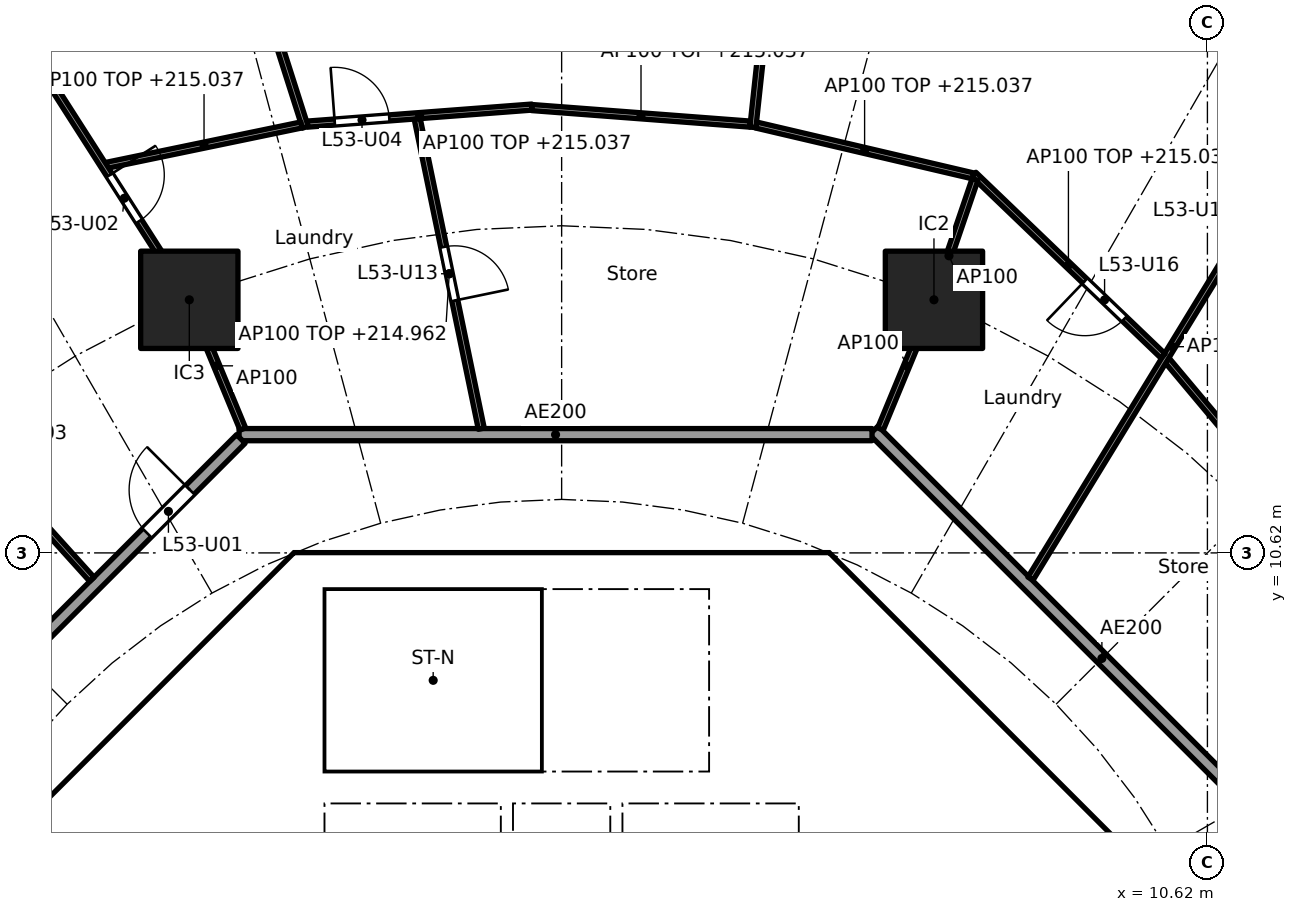
"""IFC4 building model, lengths in metres.
Left out: names, types, materials, properties, quantities, classifications, styles, units other than length and angle.
Written with IfcOpenShell. Run it as: python <this file> out.ifc"""

import sys

from ifc_helpers import new_model, si_unit, direction, frame, frame_2d, origin, origin_2d, place, context, subcontext, project, spatial, polyline, rectangle, outline, extrude, element, fill, save


model = new_model("IFC4")
c1 = context("Model", 3, precision=1e-05, world=origin(), true_north=direction((0.0, 1.0)))
c2 = subcontext(c1, "Body", "Model", "MODEL_VIEW")
j1 = project(units=[si_unit("LENGTHUNIT", "METRE"), si_unit("PLANEANGLEUNIT", "RADIAN")], contexts=[c1])
p1 = place(None, origin())
s1 = spatial("IfcSite", under=j1, at=p1, CompositionType="ELEMENT")
p2 = place(p1, origin())
s2 = spatial("IfcBuilding", under=s1, at=p2, CompositionType="ELEMENT")
p3 = place(p2, frame((0.0, 0.0, 212.2)))
s3 = spatial("IfcBuildingStorey", under=s2, at=p3, CompositionType="ELEMENT", Elevation=212.2)
for number, where, z_axis, x_axis in (
    (1, (6.123, 14.782, 0.0), (0.0, 0.0, 1.0), (1.0, 0.0, 0.0)),
    (2, (-6.123, 14.782, 0.0), (0.0, 0.0, 1.0), (1.0, 0.0, 0.0)),
):
    element("IfcColumn", number, at=place(p3, frame(where, z_axis=z_axis, x_axis=x_axis)), inside=s3, PredefinedType="COLUMN", context=c2, shape_type="SweptSolid", body=[
        extrude(rectangle(XDim=1.6, YDim=1.6, at=origin_2d()), origin(), (0.0, 0.0, 1.0), 3.7),
    ])
p4 = place(p3, frame((9.988, 4.613, 0.0), z_axis=(0.0, 0.0, 1.0), x_axis=(-0.707106781187, 0.707106781187, 0.0)))
e3 = element("IfcWall", 3, at=p4, inside=s3, PredefinedType="SHEAR", context=c2, shape_type="SweptSolid", body=[
    extrude(rectangle(XDim=7.602, YDim=0.6, at=frame_2d((3.801, 0.0))), origin(), (0.0, 0.0, 1.0), 3.44),
])
p5 = place(p4, frame((3.201, 0.0, 0.0)))
e4 = element("IfcOpeningElement", 4, at=p5, cuts=e3, PredefinedType="OPENING", context=c2, shape_type="SweptSolid", body=[
    extrude(rectangle(XDim=1.2, YDim=2.1, at=frame_2d((0.6, 1.05))), frame((0.0, 0.31, 0.0), z_axis=(0.0, -1.0, 0.0), x_axis=(1.0, 0.0, 0.0)), (0.0, 0.0, 1.0), 0.62),
])
p6 = place(p3, frame((-4.613, 9.988, 0.0), z_axis=(0.0, 0.0, 1.0), x_axis=(-0.707106781187, -0.707106781187, 0.0)))
e5 = element("IfcWall", 5, at=p6, inside=s3, PredefinedType="SHEAR", context=c2, shape_type="SweptSolid", body=[
    extrude(rectangle(XDim=7.602, YDim=0.6, at=frame_2d((3.801, 0.0))), origin(), (0.0, 0.0, 1.0), 3.44),
])
p7 = place(p6, frame((0.351, 0.0, 0.0)))
e6 = element("IfcOpeningElement", 6, at=p7, cuts=e5, PredefinedType="OPENING", context=c2, shape_type="SweptSolid", body=[
    extrude(rectangle(XDim=1.1, YDim=2.1, at=frame_2d((0.55, 1.05))), frame((0.0, 0.31, 0.0), z_axis=(0.0, -1.0, 0.0), x_axis=(1.0, 0.0, 0.0)), (0.0, 0.0, 1.0), 0.62),
])
p8 = place(p3, frame((-5.8, 4.3, 0.0), z_axis=(0.0, 0.0, 1.0), x_axis=(0.0, 1.0, 0.0)))
e7 = element("IfcWall", 7, at=p8, inside=s3, PredefinedType="PARTITIONING", context=c2, shape_type="SweptSolid", body=[
    extrude(rectangle(XDim=3.927, YDim=0.15, at=frame_2d((1.963, 0.0))), origin(), (0.0, 0.0, 1.0), 3.44),
])
p9 = place(p8, frame((1.551, 0.0, 0.0)))
e8 = element("IfcOpeningElement", 8, at=p9, cuts=e7, PredefinedType="OPENING", context=c2, shape_type="SweptSolid", body=[
    extrude(rectangle(XDim=0.9, YDim=2.1, at=frame_2d((0.45, 1.05))), frame((0.0, 0.085, 0.0), z_axis=(0.0, -1.0, 0.0), x_axis=(1.0, 0.0, 0.0)), (0.0, 0.0, 1.0), 0.17),
])
p10 = place(p3, frame((4.0, 4.3, 0.0), z_axis=(0.0, 0.0, 1.0), x_axis=(0.0, 1.0, 0.0)))
e9 = element("IfcWall", 9, at=p10, inside=s3, PredefinedType="SOLIDWALL", context=c2, shape_type="SweptSolid", body=[
    extrude(rectangle(XDim=2.2, YDim=0.2, at=frame_2d((1.1, 0.0))), origin(), (0.0, 0.0, 1.0), 3.44),
])
p11 = place(p10, frame((0.55, 0.0, 0.0)))
e10 = element("IfcOpeningElement", 10, at=p11, cuts=e9, PredefinedType="OPENING", context=c2, shape_type="SweptSolid", body=[
    extrude(rectangle(XDim=1.1, YDim=2.1, at=frame_2d((0.55, 1.05))), frame((0.0, 0.11, 0.0), z_axis=(0.0, -1.0, 0.0), x_axis=(1.0, 0.0, 0.0)), (0.0, 0.0, 1.0), 0.22),
])
p12 = place(p3, frame((-4.0, 4.3, 0.0), z_axis=(0.0, 0.0, 1.0), x_axis=(0.0, 1.0, 0.0)))
e11 = element("IfcWall", 11, at=p12, inside=s3, PredefinedType="SOLIDWALL", context=c2, shape_type="SweptSolid", body=[
    extrude(rectangle(XDim=2.2, YDim=0.2, at=frame_2d((1.1, 0.0))), origin(), (0.0, 0.0, 1.0), 3.44),
])
p13 = place(p12, frame((0.55, 0.0, 0.0)))
e12 = element("IfcOpeningElement", 12, at=p13, cuts=e11, PredefinedType="OPENING", context=c2, shape_type="SweptSolid", body=[
    extrude(rectangle(XDim=1.1, YDim=2.1, at=frame_2d((0.55, 1.05))), frame((0.0, 0.11, 0.0), z_axis=(0.0, -1.0, 0.0), x_axis=(1.0, 0.0, 0.0)), (0.0, 0.0, 1.0), 0.22),
])
p14 = place(p3, frame((4.0, 7.025, 0.0), z_axis=(0.0, 0.0, 1.0), x_axis=(0.0, 1.0, 0.0)))
e13 = element("IfcWall", 13, at=p14, inside=s3, PredefinedType="SOLIDWALL", context=c2, shape_type="SweptSolid", body=[
    extrude(rectangle(XDim=3.0, YDim=0.2, at=frame_2d((1.5, 0.0))), origin(), (0.0, 0.0, 1.0), 3.44),
])
p15 = place(p14, frame((0.925, 0.0, 0.0)))
e14 = element("IfcOpeningElement", 14, at=p15, cuts=e13, PredefinedType="OPENING", context=c2, shape_type="SweptSolid", body=[
    extrude(rectangle(XDim=1.1, YDim=2.1, at=frame_2d((0.55, 1.05))), frame((0.0, 0.11, 0.0), z_axis=(0.0, -1.0, 0.0), x_axis=(1.0, 0.0, 0.0)), (0.0, 0.0, 1.0), 0.22),
])
p16 = place(p3, origin())
e15 = element("IfcWall", 15, at=p16, inside=s3, PredefinedType="SHEAR", context=c2, shape_type="SweptSolid", body=[
    extrude(outline(polyline([(-4.152, 10.025), (-4.401, 9.776), (-4.825, 10.2), (-4.401, 10.625), (4.401, 10.625), (4.825, 10.2), (4.401, 9.776), (4.152, 10.025), (-4.152, 10.025)])), origin(), (0.0, 0.0, 1.0), 3.44),
])
for number, where, z_axis, x_axis in (
    (16, (-0.9, 4.3, 0.0), (0.0, 0.0, 1.0), (0.0, 1.0, 0.0)),
    (17, (0.9, 4.3, 0.0), (0.0, 0.0, 1.0), (0.0, 1.0, 0.0)),
):
    element("IfcWall", number, at=place(p3, frame(where, z_axis=z_axis, x_axis=x_axis)), inside=s3, PredefinedType="SOLIDWALL", context=c2, shape_type="SweptSolid", body=[
        extrude(rectangle(XDim=2.2, YDim=0.2, at=frame_2d((1.1, 0.0))), origin(), (0.0, 0.0, 1.0), 3.44),
    ])
p17 = place(p3, origin())
e18 = element("IfcWall", 18, at=p17, inside=s3, PredefinedType="SOLIDWALL", context=c2, shape_type="SweptSolid", body=[
    extrude(outline(polyline([(-3.9, 7.025), (-4.1, 7.025), (-4.1, 10.025), (-3.9, 10.025), (-3.9, 7.025)])), origin(), (0.0, 0.0, 1.0), 3.44),
])
p18 = place(p3, origin())
e19 = element("IfcWall", 19, at=p18, inside=s3, PredefinedType="SOLIDWALL", context=c2, shape_type="SweptSolid", body=[
    extrude(outline(polyline([(4.1, 6.5), (-4.1, 6.5), (-4.1, 7.025), (4.1, 7.025), (4.1, 6.5)])), origin(), (0.0, 0.0, 1.0), 3.44),
])
p19 = place(p3, frame((12.635, 5.134, 0.0), z_axis=(0.0, 0.0, 1.0), x_axis=(-0.707106781187, 0.707106781187, 0.0)))
e20 = element("IfcWall", 20, at=p19, inside=s3, PredefinedType="PARTITIONING", context=c2, shape_type="SweptSolid", body=[
    extrude(rectangle(XDim=10.609, YDim=0.2, at=frame_2d((5.305, 0.0))), origin(), (0.0, 0.0, 1.0), 3.44),
])
p20 = place(p3, frame((5.104, 12.565, 0.0), z_axis=(0.0, 0.0, 1.0), x_axis=(-1.0, 0.0, 0.0)))
e21 = element("IfcWall", 21, at=p20, inside=s3, PredefinedType="PARTITIONING", context=c2, shape_type="SweptSolid", body=[
    extrude(rectangle(XDim=10.409, YDim=0.2, at=frame_2d((5.205, 0.0))), origin(), (0.0, 0.0, 1.0), 3.44),
])
p21 = place(p3, frame((-5.275, 12.494, 0.0), z_axis=(0.0, 0.0, 1.0), x_axis=(-0.707106781187, -0.707106781187, 0.0)))
e22 = element("IfcWall", 22, at=p21, inside=s3, PredefinedType="PARTITIONING", context=c2, shape_type="SweptSolid", body=[
    extrude(rectangle(XDim=10.209, YDim=0.2, at=frame_2d((5.104, 0.0))), origin(), (0.0, 0.0, 1.0), 3.44),
])
p22 = place(p21, frame((1.185, 0.0, 0.0)))
e23 = element("IfcOpeningElement", 23, at=p22, cuts=e22, PredefinedType="OPENING", context=c2, shape_type="SweptSolid", body=[
    extrude(rectangle(XDim=1.0, YDim=2.1, at=frame_2d((0.5, 1.05))), frame((0.0, 0.11, 0.0), z_axis=(0.0, -1.0, 0.0), x_axis=(1.0, 0.0, 0.0)), (0.0, 0.0, 1.0), 0.22),
])
p23 = place(p3, frame((12.759, 10.443, 0.0), z_axis=(0.0, 0.0, 1.0), x_axis=(-0.642225196965, 0.766516011825, 0.0)))
e24 = element("IfcWall", 24, at=p23, inside=s3, PredefinedType="PARTITIONING", context=c2, shape_type="SweptSolid", body=[
    extrude(rectangle(XDim=4.361, YDim=0.1, at=frame_2d((2.18, 0.0))), origin(), (0.0, 0.0, 1.0), 2.837),
])
p24 = place(p3, frame((7.71, 10.197, 0.0), z_axis=(0.0, 0.0, 1.0), x_axis=(0.521477621335, 0.853264959111, 0.0)))
e25 = element("IfcWall", 25, at=p24, inside=s3, PredefinedType="PARTITIONING", context=c2, shape_type="SweptSolid", body=[
    extrude(rectangle(XDim=8.941, YDim=0.1, at=frame_2d((4.471, 0.0))), origin(), (0.0, 0.0, 1.0), 2.762),
])
p25 = place(p24, frame((6.121, 0.0, 0.0)))
e26 = element("IfcOpeningElement", 26, at=p25, cuts=e25, PredefinedType="OPENING", context=c2, shape_type="SweptSolid", body=[
    extrude(rectangle(XDim=0.9, YDim=2.1, at=frame_2d((0.45, 1.05))), frame((0.0, 0.06, 0.0), z_axis=(0.0, -1.0, 0.0), x_axis=(1.0, 0.0, 0.0)), (0.0, 0.0, 1.0), 0.12),
])
p26 = place(p3, frame((9.89, 13.858, 0.0), z_axis=(0.0, 0.0, 1.0), x_axis=(-0.72167233993, 0.692234811159, 0.0)))
e27 = element("IfcWall", 27, at=p26, inside=s3, PredefinedType="PARTITIONING", context=c2, shape_type="SweptSolid", body=[
    extrude(rectangle(XDim=4.313, YDim=0.1, at=frame_2d((2.156, 0.0))), origin(), (0.0, 0.0, 1.0), 2.837),
])
p27 = place(p26, frame((0.883, 0.0, 0.0)))
e28 = element("IfcOpeningElement", 28, at=p27, cuts=e27, PredefinedType="OPENING", context=c2, shape_type="SweptSolid", body=[
    extrude(rectangle(XDim=0.9, YDim=2.1, at=frame_2d((0.45, 1.05))), frame((0.0, 0.06, 0.0), z_axis=(0.0, -1.0, 0.0), x_axis=(1.0, 0.0, 0.0)), (0.0, 0.0, 1.0), 0.12),
])
p28 = place(p3, frame((12.31, 17.817, 0.0), z_axis=(0.0, 0.0, 1.0), x_axis=(-0.739697052892, 0.672940019573, 0.0)))
e29 = element("IfcWall", 29, at=p28, inside=s3, PredefinedType="PARTITIONING", context=c2, shape_type="SweptSolid", body=[
    extrude(rectangle(XDim=5.365, YDim=0.1, at=frame_2d((2.683, 0.0))), origin(), (0.0, 0.0, 1.0), 2.837),
])
p29 = place(p28, frame((2.208, 0.0, 0.0)))
e30 = element("IfcOpeningElement", 30, at=p29, cuts=e29, PredefinedType="OPENING", context=c2, shape_type="SweptSolid", body=[
    extrude(rectangle(XDim=0.9, YDim=2.1, at=frame_2d((0.45, 1.05))), frame((0.0, 0.06, 0.0), z_axis=(0.0, -1.0, 0.0), x_axis=(1.0, 0.0, 0.0)), (0.0, 0.0, 1.0), 0.12),
])
p30 = place(p3, frame((5.243, 12.657, 0.0), z_axis=(0.0, 0.0, 1.0), x_axis=(0.382719158442, 0.923864733477, 0.0)))
e31 = element("IfcWall", 31, at=p30, inside=s3, PredefinedType="PARTITIONING", context=c2, shape_type="SweptSolid", body=[
    extrude(rectangle(XDim=2.25, YDim=0.1, at=frame_2d((1.125, 0.0))), origin(), (0.0, 0.0, 1.0), 3.44),
])
p31 = place(p3, frame((6.139, 14.829, 0.0), z_axis=(0.0, 0.0, 1.0), x_axis=(0.32278593828, 0.946471995385, 0.0)))
e32 = element("IfcWall", 32, at=p31, inside=s3, PredefinedType="PARTITIONING", context=c2, shape_type="SweptSolid", body=[
    extrude(rectangle(XDim=2.042, YDim=0.1, at=frame_2d((1.021, 0.0))), origin(), (0.0, 0.0, 1.0), 3.44),
])
p32 = place(p3, frame((6.766, 16.82, 0.0), z_axis=(0.0, 0.0, 1.0), x_axis=(-0.973612608559, 0.22820711745, 0.0)))
e33 = element("IfcWall", 33, at=p32, inside=s3, PredefinedType="PARTITIONING", context=c2, shape_type="SweptSolid", body=[
    extrude(rectangle(XDim=3.663, YDim=0.1, at=frame_2d((1.832, 0.0))), origin(), (0.0, 0.0, 1.0), 2.837),
])
p33 = place(p3, frame((3.145, 17.618, 0.0), z_axis=(0.0, 0.0, 1.0), x_axis=(0.106820754108, 0.994278294288, 0.0)))
e34 = element("IfcWall", 34, at=p33, inside=s3, PredefinedType="PARTITIONING", context=c2, shape_type="SweptSolid", body=[
    extrude(rectangle(XDim=5.574, YDim=0.1, at=frame_2d((2.787, 0.0))), origin(), (0.0, 0.0, 1.0), 3.44),
])
p34 = place(p33, frame((2.337, 0.0, 0.0)))
e35 = element("IfcOpeningElement", 35, at=p34, cuts=e34, PredefinedType="OPENING", context=c2, shape_type="SweptSolid", body=[
    extrude(rectangle(XDim=0.9, YDim=2.1, at=frame_2d((0.45, 1.05))), frame((0.0, 0.06, 0.0), z_axis=(0.0, -1.0, 0.0), x_axis=(1.0, 0.0, 0.0)), (0.0, 0.0, 1.0), 0.12),
])
p35 = place(p3, frame((3.101, 17.671, 0.0), z_axis=(0.0, 0.0, 1.0), x_axis=(-0.997133705575, 0.075659587668, 0.0)))
e36 = element("IfcWall", 36, at=p35, inside=s3, PredefinedType="PARTITIONING", context=c2, shape_type="SweptSolid", body=[
    extrude(rectangle(XDim=3.601, YDim=0.1, at=frame_2d((1.801, 0.0))), origin(), (0.0, 0.0, 1.0), 2.837),
])
p36 = place(p3, frame((-0.49, 17.951, 0.0), z_axis=(0.0, 0.0, 1.0), x_axis=(-0.997133495787, -0.075662352452, 0.0)))
e37 = element("IfcWall", 37, at=p36, inside=s3, PredefinedType="PARTITIONING", context=c2, shape_type="SweptSolid", body=[
    extrude(rectangle(XDim=3.701, YDim=0.1, at=frame_2d((1.851, 0.0))), origin(), (0.0, 0.0, 1.0), 2.837),
])
p37 = place(p36, frame((2.351, 0.0, 0.0)))
e38 = element("IfcOpeningElement", 38, at=p37, cuts=e37, PredefinedType="OPENING", context=c2, shape_type="SweptSolid", body=[
    extrude(rectangle(XDim=0.9, YDim=2.1, at=frame_2d((0.45, 1.05))), frame((0.0, 0.06, 0.0), z_axis=(0.0, -1.0, 0.0), x_axis=(1.0, 0.0, 0.0)), (0.0, 0.0, 1.0), 0.12),
])
p38 = place(p3, frame((-1.321, 12.663, 0.0), z_axis=(0.0, 0.0, 1.0), x_axis=(-0.202526486639, 0.979276785291, 0.0)))
e39 = element("IfcWall", 39, at=p38, inside=s3, PredefinedType="PARTITIONING", context=c2, shape_type="SweptSolid", body=[
    extrude(rectangle(XDim=5.204, YDim=0.1, at=frame_2d((2.602, 0.0))), origin(), (0.0, 0.0, 1.0), 2.762),
])
p39 = place(p38, frame((2.152, 0.0, 0.0)))
e40 = element("IfcOpeningElement", 40, at=p39, cuts=e39, PredefinedType="OPENING", context=c2, shape_type="SweptSolid", body=[
    extrude(rectangle(XDim=0.9, YDim=2.1, at=frame_2d((0.45, 1.05))), frame((0.0, 0.06, 0.0), z_axis=(0.0, -1.0, 0.0), x_axis=(1.0, 0.0, 0.0)), (0.0, 0.0, 1.0), 0.12),
])
p40 = place(p3, frame((-4.215, 17.62, 0.0), z_axis=(0.0, 0.0, 1.0), x_axis=(-0.303985237897, 0.952676742206, 0.0)))
e41 = element("IfcWall", 41, at=p40, inside=s3, PredefinedType="PARTITIONING", context=c2, shape_type="SweptSolid", body=[
    extrude(rectangle(XDim=11.499, YDim=0.1, at=frame_2d((5.75, 0.0))), origin(), (0.0, 0.0, 1.0), 2.837),
])
p41 = place(p40, frame((2.457, 0.0, 0.0)))
e42 = element("IfcOpeningElement", 42, at=p41, cuts=e41, PredefinedType="OPENING", context=c2, shape_type="SweptSolid", body=[
    extrude(rectangle(XDim=0.9, YDim=2.1, at=frame_2d((0.45, 1.05))), frame((0.0, 0.06, 0.0), z_axis=(0.0, -1.0, 0.0), x_axis=(1.0, 0.0, 0.0)), (0.0, 0.0, 1.0), 0.12),
])
p42 = place(p40, frame((8.181, 0.0, 0.0)))
e43 = element("IfcOpeningElement", 43, at=p42, cuts=e41, PredefinedType="OPENING", context=c2, shape_type="SweptSolid", body=[
    extrude(rectangle(XDim=0.9, YDim=2.1, at=frame_2d((0.45, 1.05))), frame((0.0, 0.06, 0.0), z_axis=(0.0, -1.0, 0.0), x_axis=(1.0, 0.0, 0.0)), (0.0, 0.0, 1.0), 0.12),
])
p43 = place(p3, frame((-4.28, 17.657, 0.0), z_axis=(0.0, 0.0, 1.0), x_axis=(-0.979205232861, -0.202872156637, 0.0)))
e44 = element("IfcWall", 44, at=p43, inside=s3, PredefinedType="PARTITIONING", context=c2, shape_type="SweptSolid", body=[
    extrude(rectangle(XDim=3.271, YDim=0.1, at=frame_2d((1.635, 0.0))), origin(), (0.0, 0.0, 1.0), 2.837),
])
p44 = place(p3, frame((-5.243, 12.657, 0.0), z_axis=(0.0, 0.0, 1.0), x_axis=(-0.382757529444, 0.923848837015, 0.0)))
e45 = element("IfcWall", 45, at=p44, inside=s3, PredefinedType="PARTITIONING", context=c2, shape_type="SweptSolid", body=[
    extrude(rectangle(XDim=2.25, YDim=0.1, at=frame_2d((1.125, 0.0))), origin(), (0.0, 0.0, 1.0), 3.44),
])
p45 = place(p3, frame((-6.15, 14.824, 0.0), z_axis=(0.0, 0.0, 1.0), x_axis=(-0.538870687577, 0.842388498301, 0.0)))
e46 = element("IfcWall", 46, at=p45, inside=s3, PredefinedType="PARTITIONING", context=c2, shape_type="SweptSolid", body=[
    extrude(rectangle(XDim=13.213, YDim=0.1, at=frame_2d((6.606, 0.0))), origin(), (0.0, 0.0, 1.0), 2.837),
])
p46 = place(p45, frame((1.483, 0.0, 0.0)))
e47 = element("IfcOpeningElement", 47, at=p46, cuts=e46, PredefinedType="OPENING", context=c2, shape_type="SweptSolid", body=[
    extrude(rectangle(XDim=0.9, YDim=2.1, at=frame_2d((0.45, 1.05))), frame((0.0, 0.06, 0.0), z_axis=(0.0, -1.0, 0.0), x_axis=(1.0, 0.0, 0.0)), (0.0, 0.0, 1.0), 0.12),
])
p47 = place(p3, frame((-7.725, 10.186, 0.0), z_axis=(0.0, 0.0, 1.0), x_axis=(-0.669819599194, 0.742523874725, 0.0)))
e48 = element("IfcWall", 48, at=p47, inside=s3, PredefinedType="PARTITIONING", context=c2, shape_type="SweptSolid", body=[
    extrude(rectangle(XDim=10.282, YDim=0.1, at=frame_2d((5.141, 0.0))), origin(), (0.0, 0.0, 1.0), 2.762),
])
p48 = place(p47, frame((2.0, 0.0, 0.0)))
e49 = element("IfcOpeningElement", 49, at=p48, cuts=e48, PredefinedType="OPENING", context=c2, shape_type="SweptSolid", body=[
    extrude(rectangle(XDim=0.9, YDim=2.1, at=frame_2d((0.45, 1.05))), frame((0.0, 0.06, 0.0), z_axis=(0.0, -1.0, 0.0), x_axis=(1.0, 0.0, 0.0)), (0.0, 0.0, 1.0), 0.12),
])
p49 = place(p47, frame((7.116, 0.0, 0.0)))
e50 = element("IfcOpeningElement", 50, at=p49, cuts=e48, PredefinedType="OPENING", context=c2, shape_type="SweptSolid", body=[
    extrude(rectangle(XDim=0.9, YDim=2.1, at=frame_2d((0.45, 1.05))), frame((0.0, 0.06, 0.0), z_axis=(0.0, -1.0, 0.0), x_axis=(1.0, 0.0, 0.0)), (0.0, 0.0, 1.0), 0.12),
])
p50 = place(p15, origin())
e51 = element("IfcDoor", 51, at=p50, inside=s3, OperationType="SINGLE_SWING_RIGHT", PredefinedType="DOOR", context=c2, shape_type="SweptSolid", body=[
    extrude(rectangle(XDim=1.1, YDim=2.1, at=frame_2d((0.55, 1.05))), frame((0.0, 0.025, 0.0), z_axis=(0.0, -1.0, 0.0), x_axis=(1.0, 0.0, 0.0)), (0.0, 0.0, 1.0), 0.05),
])
fill(e14, e51)
p51 = place(p9, origin())
e52 = element("IfcDoor", 52, at=p51, inside=s3, OperationType="SINGLE_SWING_LEFT", PredefinedType="DOOR", context=c2, shape_type="SweptSolid", body=[
    extrude(rectangle(XDim=0.9, YDim=2.1, at=frame_2d((0.45, 1.05))), frame((0.0, 0.025, 0.0), z_axis=(0.0, -1.0, 0.0), x_axis=(1.0, 0.0, 0.0)), (0.0, 0.0, 1.0), 0.05),
])
fill(e8, e52)
p52 = place(p5, origin())
e53 = element("IfcDoor", 53, at=p52, inside=s3, OperationType="SINGLE_SWING_LEFT", PredefinedType="DOOR", context=c2, shape_type="SweptSolid", body=[
    extrude(rectangle(XDim=1.2, YDim=2.1, at=frame_2d((0.6, 1.05))), frame((0.0, 0.025, 0.0), z_axis=(0.0, -1.0, 0.0), x_axis=(1.0, 0.0, 0.0)), (0.0, 0.0, 1.0), 0.05),
])
fill(e4, e53)
p53 = place(p7, origin())
e54 = element("IfcDoor", 54, at=p53, inside=s3, OperationType="SINGLE_SWING_LEFT", PredefinedType="DOOR", context=c2, shape_type="SweptSolid", body=[
    extrude(rectangle(XDim=1.1, YDim=2.1, at=frame_2d((0.55, 1.05))), frame((0.0, 0.025, 0.0), z_axis=(0.0, -1.0, 0.0), x_axis=(1.0, 0.0, 0.0)), (0.0, 0.0, 1.0), 0.05),
])
fill(e6, e54)
p54 = place(p22, frame((1.0, 0.0, 0.0), x_axis=(-1.0, 0.0, 0.0)))
e55 = element("IfcDoor", 55, at=p54, inside=s3, OperationType="SINGLE_SWING_RIGHT", PredefinedType="DOOR", context=c2, shape_type="SweptSolid", body=[
    extrude(rectangle(XDim=1.0, YDim=2.1, at=frame_2d((0.5, 1.05))), frame((0.0, 0.025, 0.0), z_axis=(0.0, -1.0, 0.0), x_axis=(1.0, 0.0, 0.0)), (0.0, 0.0, 1.0), 0.05),
])
fill(e23, e55)
p55 = place(p46, frame((0.9, 0.0, 0.0), x_axis=(-1.0, 0.0, 0.0)))
e56 = element("IfcDoor", 56, at=p55, inside=s3, OperationType="SINGLE_SWING_LEFT", PredefinedType="DOOR", context=c2, shape_type="SweptSolid", body=[
    extrude(rectangle(XDim=0.9, YDim=2.1, at=frame_2d((0.45, 1.05))), frame((0.0, 0.025, 0.0), z_axis=(0.0, -1.0, 0.0), x_axis=(1.0, 0.0, 0.0)), (0.0, 0.0, 1.0), 0.05),
])
fill(e47, e56)
p56 = place(p37, frame((0.9, 0.0, 0.0), x_axis=(-1.0, 0.0, 0.0)))
e57 = element("IfcDoor", 57, at=p56, inside=s3, OperationType="SINGLE_SWING_LEFT", PredefinedType="DOOR", context=c2, shape_type="SweptSolid", body=[
    extrude(rectangle(XDim=0.9, YDim=2.1, at=frame_2d((0.45, 1.05))), frame((0.0, 0.025, 0.0), z_axis=(0.0, -1.0, 0.0), x_axis=(1.0, 0.0, 0.0)), (0.0, 0.0, 1.0), 0.05),
])
fill(e38, e57)
p57 = place(p39, frame((0.9, 0.0, 0.0), x_axis=(-1.0, 0.0, 0.0)))
e58 = element("IfcDoor", 58, at=p57, inside=s3, OperationType="SINGLE_SWING_RIGHT", PredefinedType="DOOR", context=c2, shape_type="SweptSolid", body=[
    extrude(rectangle(XDim=0.9, YDim=2.1, at=frame_2d((0.45, 1.05))), frame((0.0, 0.025, 0.0), z_axis=(0.0, -1.0, 0.0), x_axis=(1.0, 0.0, 0.0)), (0.0, 0.0, 1.0), 0.05),
])
fill(e40, e58)
p58 = place(p27, origin())
e59 = element("IfcDoor", 59, at=p58, inside=s3, OperationType="SINGLE_SWING_RIGHT", PredefinedType="DOOR", context=c2, shape_type="SweptSolid", body=[
    extrude(rectangle(XDim=0.9, YDim=2.1, at=frame_2d((0.45, 1.05))), frame((0.0, 0.025, 0.0), z_axis=(0.0, -1.0, 0.0), x_axis=(1.0, 0.0, 0.0)), (0.0, 0.0, 1.0), 0.05),
])
fill(e28, e59)
save(model, sys.argv[1])
